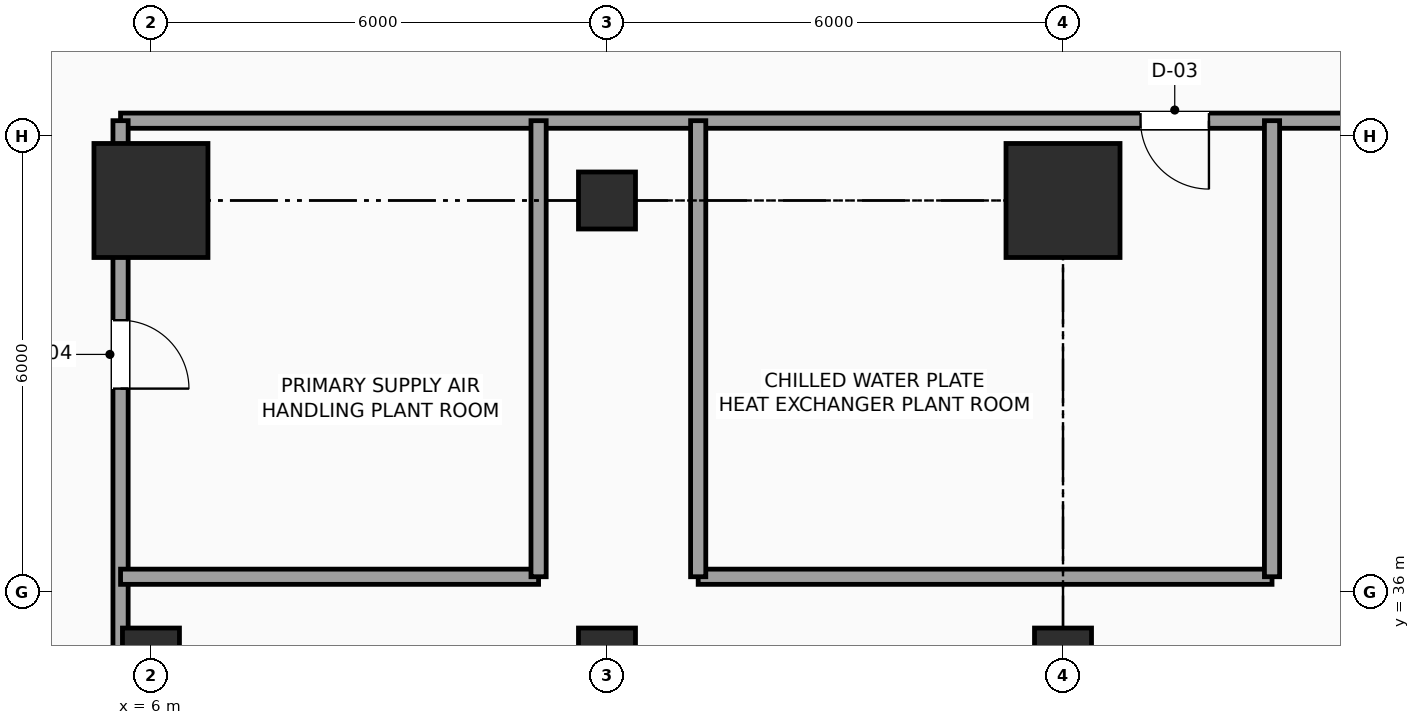
"""IFC4 building model, lengths in metres.
Left out: names, types, materials, properties, quantities, classifications, styles, units other than length and angle.
Written with IfcOpenShell. Run it as: python <this file> out.ifc"""

import sys

from ifc_helpers import new_model, si_unit, direction, frame, frame_2d, origin, origin_2d, place, context, subcontext, project, spatial, rectangle, hollow_rectangle, extrude, element, fill, save


model = new_model("IFC4")
c1 = context("Model", 3, precision=1e-05, world=origin(), true_north=direction((0.0, 1.0)))
c2 = subcontext(c1, "Body", "Model", "MODEL_VIEW")
j1 = project(units=[si_unit("LENGTHUNIT", "METRE"), si_unit("PLANEANGLEUNIT", "RADIAN")], contexts=[c1])
p1 = place(None, origin())
s1 = spatial("IfcSite", under=j1, at=p1, CompositionType="ELEMENT")
p2 = place(p1, origin())
s2 = spatial("IfcBuilding", under=s1, at=p2, CompositionType="ELEMENT")
p3 = place(p2, frame((0.0, 0.0, 27.6)))
s3 = spatial("IfcBuildingStorey", under=s2, at=p3, CompositionType="ELEMENT", Elevation=27.6)
p4 = place(p3, frame((6.0, 35.15, -0.35), z_axis=(0.0, 0.0, 1.0), x_axis=(1.0, 0.0, 0.0)))
e1 = element("IfcColumn", 1, at=p4, inside=s3, PredefinedType="COLUMN", context=c2, shape_type="SweptSolid", body=[
    extrude(hollow_rectangle(XDim=0.75, YDim=0.75, WallThickness=0.035, InnerFilletRadius=0.035, OuterFilletRadius=0.05, at=origin_2d()), origin(), (0.0, 0.0, 1.0), 5.15),
])
p5 = place(p3, frame((6.0, 41.15, -0.35), z_axis=(0.0, 0.0, 1.0), x_axis=(1.0, 0.0, 0.0)))
e2 = element("IfcColumn", 2, at=p5, inside=s3, PredefinedType="COLUMN", context=c2, shape_type="SweptSolid", body=[
    extrude(rectangle(XDim=1.5, YDim=1.5, at=origin_2d()), origin(), (0.0, 0.0, 1.0), 5.15),
])
for number, where, z_axis, x_axis in (
    (3, (12.0, 35.15, -0.35), (0.0, 0.0, 1.0), (1.0, 0.0, 0.0)),
    (4, (12.0, 41.15, -0.35), (0.0, 0.0, 1.0), (1.0, 0.0, 0.0)),
    (5, (18.0, 35.15, -0.35), (0.0, 0.0, 1.0), (1.0, 0.0, 0.0)),
):
    element("IfcColumn", number, at=place(p3, frame(where, z_axis=z_axis, x_axis=x_axis)), inside=s3, PredefinedType="COLUMN", context=c2, shape_type="SweptSolid", body=[
        extrude(hollow_rectangle(XDim=0.75, YDim=0.75, WallThickness=0.035, InnerFilletRadius=0.035, OuterFilletRadius=0.05, at=origin_2d()), origin(), (0.0, 0.0, 1.0), 5.15),
    ])
p6 = place(p3, frame((18.0, 41.15, -0.35), z_axis=(0.0, 0.0, 1.0), x_axis=(1.0, 0.0, 0.0)))
e6 = element("IfcColumn", 6, at=p6, inside=s3, PredefinedType="COLUMN", context=c2, shape_type="SweptSolid", body=[
    extrude(rectangle(XDim=1.5, YDim=1.5, at=origin_2d()), origin(), (0.0, 0.0, 1.0), 5.15),
])
p7 = place(p3, frame((23.7, 42.2, 0.0), z_axis=(0.0, 0.0, 1.0), x_axis=(-1.0, 0.0, 0.0)))
e7 = element("IfcWall", 7, at=p7, inside=s3, PredefinedType="SOLIDWALL", context=c2, shape_type="SweptSolid", body=[
    extrude(rectangle(XDim=18.1, YDim=0.2, at=frame_2d((9.05, 0.0))), origin(), (0.0, 0.0, 1.0), 4.55),
])
p8 = place(p7, frame((3.78, 0.0, 0.0)))
e8 = element("IfcOpeningElement", 8, at=p8, cuts=e7, PredefinedType="OPENING", context=c2, shape_type="SweptSolid", body=[
    extrude(rectangle(XDim=0.9, YDim=2.15, at=frame_2d((0.45, 1.075))), frame((0.0, 0.11, 0.0), z_axis=(0.0, -1.0, 0.0), x_axis=(1.0, 0.0, 0.0)), (0.0, 0.0, 1.0), 0.22),
])
p9 = place(p3, frame((5.6, 42.2, 0.0), z_axis=(0.0, 0.0, 1.0), x_axis=(0.0, -1.0, 0.0)))
e9 = element("IfcWall", 9, at=p9, inside=s3, PredefinedType="SOLIDWALL", context=c2, shape_type="SweptSolid", body=[
    extrude(rectangle(XDim=8.4, YDim=0.2, at=frame_2d((4.2, 0.0))), origin(), (0.0, 0.0, 1.0), 4.55),
])
p10 = place(p9, frame((2.625, 0.0, 0.0)))
e10 = element("IfcOpeningElement", 10, at=p10, cuts=e9, PredefinedType="OPENING", context=c2, shape_type="SweptSolid", body=[
    extrude(rectangle(XDim=0.9, YDim=2.15, at=frame_2d((0.45, 1.075))), frame((0.0, 0.11, 0.0), z_axis=(0.0, -1.0, 0.0), x_axis=(1.0, 0.0, 0.0)), (0.0, 0.0, 1.0), 0.22),
])
p11 = place(p3, frame((5.6, 36.2, 0.0), z_axis=(0.0, 0.0, 1.0), x_axis=(1.0, 0.0, 0.0)))
e11 = element("IfcWall", 11, at=p11, inside=s3, PredefinedType="SOLIDWALL", context=c2, shape_type="SweptSolid", body=[
    extrude(rectangle(XDim=5.5, YDim=0.2, at=frame_2d((2.75, 0.0))), origin(), (0.0, 0.0, 1.0), 4.55),
])
p12 = place(p3, frame((11.1, 36.2, 0.0), z_axis=(0.0, 0.0, 1.0), x_axis=(0.0, 1.0, 0.0)))
e12 = element("IfcWall", 12, at=p12, inside=s3, PredefinedType="SOLIDWALL", context=c2, shape_type="SweptSolid", body=[
    extrude(rectangle(XDim=6.0, YDim=0.2, at=frame_2d((3.0, 0.0))), origin(), (0.0, 0.0, 1.0), 4.55),
])
p13 = place(p3, frame((13.2, 36.2, 0.0), z_axis=(0.0, 0.0, 1.0), x_axis=(1.0, 0.0, 0.0)))
e13 = element("IfcWall", 13, at=p13, inside=s3, PredefinedType="SOLIDWALL", context=c2, shape_type="SweptSolid", body=[
    extrude(rectangle(XDim=7.55, YDim=0.2, at=frame_2d((3.775, 0.0))), origin(), (0.0, 0.0, 1.0), 4.55),
])
for number, where, z_axis, x_axis in (
    (14, (13.2, 36.2, 0.0), (0.0, 0.0, 1.0), (0.0, 1.0, 0.0)),
    (15, (20.75, 36.2, 0.0), (0.0, 0.0, 1.0), (0.0, 1.0, 0.0)),
):
    element("IfcWall", number, at=place(p3, frame(where, z_axis=z_axis, x_axis=x_axis)), inside=s3, PredefinedType="SOLIDWALL", context=c2, shape_type="SweptSolid", body=[
        extrude(rectangle(XDim=6.0, YDim=0.2, at=frame_2d((3.0, 0.0))), origin(), (0.0, 0.0, 1.0), 4.55),
    ])
p14 = place(p8, origin())
e16 = element("IfcDoor", 16, at=p14, inside=s3, OperationType="SINGLE_SWING_LEFT", PredefinedType="DOOR", context=c2, shape_type="SweptSolid", body=[
    extrude(rectangle(XDim=0.9, YDim=2.15, at=frame_2d((0.45, 1.075))), frame((0.0, 0.025, 0.0), z_axis=(0.0, -1.0, 0.0), x_axis=(1.0, 0.0, 0.0)), (0.0, 0.0, 1.0), 0.05),
])
fill(e8, e16)
p15 = place(p10, origin())
e17 = element("IfcDoor", 17, at=p15, inside=s3, OperationType="SINGLE_SWING_RIGHT", PredefinedType="DOOR", context=c2, shape_type="SweptSolid", body=[
    extrude(rectangle(XDim=0.9, YDim=2.15, at=frame_2d((0.45, 1.075))), frame((0.0, 0.025, 0.0), z_axis=(0.0, -1.0, 0.0), x_axis=(1.0, 0.0, 0.0)), (0.0, 0.0, 1.0), 0.05),
])
fill(e10, e17)
save(model, sys.argv[1])
